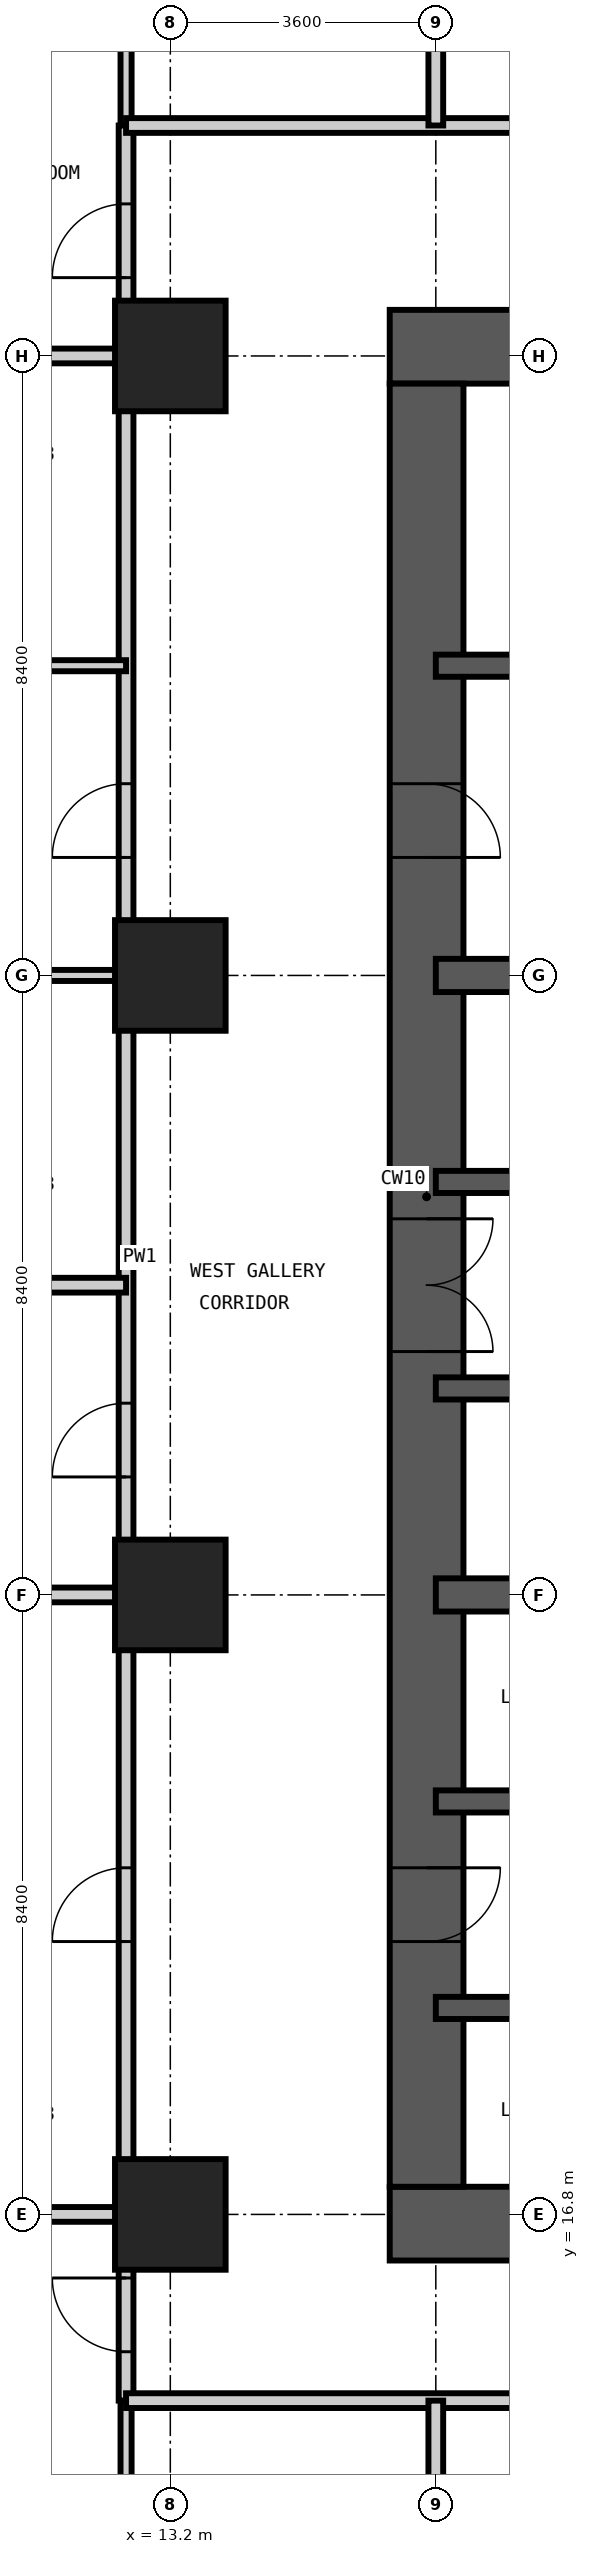
"""IFC4 building model, lengths in metres.
Left out: names, types, materials, properties, quantities, classifications, styles, units other than length and angle.
Written with IfcOpenShell. Run it as: python <this file> out.ifc"""

import sys

from ifc_helpers import new_model, si_unit, direction, frame, frame_2d, origin, origin_2d, place, context, subcontext, project, spatial, rectangle, extrude, element, fill, save


model = new_model("IFC4")
c1 = context("Model", 3, precision=1e-05, world=origin(), true_north=direction((0.0, 1.0)))
c2 = subcontext(c1, "Body", "Model", "MODEL_VIEW")
j1 = project(units=[si_unit("LENGTHUNIT", "METRE"), si_unit("PLANEANGLEUNIT", "RADIAN")], contexts=[c1])
p1 = place(None, origin())
s1 = spatial("IfcSite", under=j1, at=p1, CompositionType="ELEMENT")
p2 = place(p1, origin())
s2 = spatial("IfcBuilding", under=s1, at=p2, CompositionType="ELEMENT")
p3 = place(p2, frame((0.0, 0.0, 133.2)))
s3 = spatial("IfcBuildingStorey", under=s2, at=p3, CompositionType="ELEMENT", Elevation=133.2)
for number, where, z_axis, x_axis in (
    (1, (13.2, 16.8, -0.35), (0.0, 0.0, 1.0), (1.0, 0.0, 0.0)),
    (2, (13.2, 25.2, -0.35), (0.0, 0.0, 1.0), (1.0, 0.0, 0.0)),
    (3, (13.2, 33.6, -0.35), (0.0, 0.0, 1.0), (1.0, 0.0, 0.0)),
    (4, (13.2, 42.0, -0.35), (0.0, 0.0, 1.0), (1.0, 0.0, 0.0)),
):
    element("IfcColumn", number, at=place(p3, frame(where, z_axis=z_axis, x_axis=x_axis)), inside=s3, PredefinedType="COLUMN", context=c2, shape_type="SweptSolid", body=[
        extrude(rectangle(XDim=1.5, YDim=1.5, at=origin_2d()), origin(), (0.0, 0.0, 1.0), 3.6),
    ])
p4 = place(p3, frame((16.175, 16.675, -0.35), z_axis=(0.0, 0.0, 1.0), x_axis=(1.0, 0.0, 0.0)))
e5 = element("IfcWall", 5, at=p4, inside=s3, PredefinedType="SHEAR", context=c2, shape_type="SweptSolid", body=[
    extrude(rectangle(XDim=26.45, YDim=1.0, at=frame_2d((13.225, 0.0))), origin(), (0.0, 0.0, 1.0), 3.6),
])
p5 = place(p4, frame((12.725, 0.0, 0.35)))
e6 = element("IfcOpeningElement", 6, at=p5, cuts=e5, PredefinedType="OPENING", context=c2, shape_type="SweptSolid", body=[
    extrude(rectangle(XDim=1.0, YDim=2.1, at=frame_2d((0.5, 1.05))), frame((0.0, 0.51, 0.0), z_axis=(0.0, -1.0, 0.0), x_axis=(1.0, 0.0, 0.0)), (0.0, 0.0, 1.0), 1.02),
])
p6 = place(p4, frame((19.025, 0.0, 0.35)))
e7 = element("IfcOpeningElement", 7, at=p6, cuts=e5, PredefinedType="OPENING", context=c2, shape_type="SweptSolid", body=[
    extrude(rectangle(XDim=1.0, YDim=2.1, at=frame_2d((0.5, 1.05))), frame((0.0, 0.51, 0.0), z_axis=(0.0, -1.0, 0.0), x_axis=(1.0, 0.0, 0.0)), (0.0, 0.0, 1.0), 1.02),
])
p7 = place(p3, frame((42.625, 42.125, -0.35), z_axis=(0.0, 0.0, 1.0), x_axis=(-1.0, 0.0, 0.0)))
e8 = element("IfcWall", 8, at=p7, inside=s3, PredefinedType="SHEAR", context=c2, shape_type="SweptSolid", body=[
    extrude(rectangle(XDim=26.45, YDim=1.0, at=frame_2d((13.225, 0.0))), origin(), (0.0, 0.0, 1.0), 3.6),
])
p8 = place(p7, frame((21.125, 0.0, 0.35)))
e9 = element("IfcOpeningElement", 9, at=p8, cuts=e8, PredefinedType="OPENING", context=c2, shape_type="SweptSolid", body=[
    extrude(rectangle(XDim=1.0, YDim=2.1, at=frame_2d((0.5, 1.05))), frame((0.0, 0.51, 0.0), z_axis=(0.0, -1.0, 0.0), x_axis=(1.0, 0.0, 0.0)), (0.0, 0.0, 1.0), 1.02),
])
p9 = place(p7, frame((10.525, 0.0, 0.35)))
e10 = element("IfcOpeningElement", 10, at=p9, cuts=e8, PredefinedType="OPENING", context=c2, shape_type="SweptSolid", body=[
    extrude(rectangle(XDim=1.2, YDim=2.2, at=frame_2d((0.6, 1.1))), frame((0.0, 0.51, 0.0), z_axis=(0.0, -1.0, 0.0), x_axis=(1.0, 0.0, 0.0)), (0.0, 0.0, 1.0), 1.02),
])
p10 = place(p3, frame((16.675, 41.625, -0.35), z_axis=(0.0, 0.0, 1.0), x_axis=(0.0, -1.0, 0.0)))
e11 = element("IfcWall", 11, at=p10, inside=s3, PredefinedType="SHEAR", context=c2, shape_type="SweptSolid", body=[
    extrude(rectangle(XDim=24.45, YDim=1.0, at=frame_2d((12.225, 0.0))), origin(), (0.0, 0.0, 1.0), 3.6),
])
p11 = place(p10, frame((11.325, 0.0, 0.35)))
e12 = element("IfcOpeningElement", 12, at=p11, cuts=e11, PredefinedType="OPENING", context=c2, shape_type="SweptSolid", body=[
    extrude(rectangle(XDim=1.8, YDim=2.2, at=frame_2d((0.9, 1.1))), frame((0.0, 0.51, 0.0), z_axis=(0.0, -1.0, 0.0), x_axis=(1.0, 0.0, 0.0)), (0.0, 0.0, 1.0), 1.02),
])
p12 = place(p10, frame((20.125, 0.0, 0.35)))
e13 = element("IfcOpeningElement", 13, at=p12, cuts=e11, PredefinedType="OPENING", context=c2, shape_type="SweptSolid", body=[
    extrude(rectangle(XDim=1.0, YDim=2.1, at=frame_2d((0.5, 1.05))), frame((0.0, 0.51, 0.0), z_axis=(0.0, -1.0, 0.0), x_axis=(1.0, 0.0, 0.0)), (0.0, 0.0, 1.0), 1.02),
])
p13 = place(p10, frame((5.425, 0.0, 0.35)))
e14 = element("IfcOpeningElement", 14, at=p13, cuts=e11, PredefinedType="OPENING", context=c2, shape_type="SweptSolid", body=[
    extrude(rectangle(XDim=1.0, YDim=2.1, at=frame_2d((0.5, 1.05))), frame((0.0, 0.51, 0.0), z_axis=(0.0, -1.0, 0.0), x_axis=(1.0, 0.0, 0.0)), (0.0, 0.0, 1.0), 1.02),
])
for number, where, z_axis, x_axis in (
    (15, (16.8, 19.6, -0.35), (0.0, 0.0, 1.0), (1.0, 0.0, 0.0)),
    (16, (16.8, 22.4, -0.35), (0.0, 0.0, 1.0), (1.0, 0.0, 0.0)),
):
    element("IfcWall", number, at=place(p3, frame(where, z_axis=z_axis, x_axis=x_axis)), inside=s3, PredefinedType="SHEAR", context=c2, shape_type="SweptSolid", body=[
        extrude(rectangle(XDim=8.4, YDim=0.3, at=frame_2d((4.2, 0.0))), origin(), (0.0, 0.0, 1.0), 3.6),
    ])
p14 = place(p3, frame((16.8, 28.0, -0.35), z_axis=(0.0, 0.0, 1.0), x_axis=(1.0, 0.0, 0.0)))
e17 = element("IfcWall", 17, at=p14, inside=s3, PredefinedType="SHEAR", context=c2, shape_type="SweptSolid", body=[
    extrude(rectangle(XDim=8.4, YDim=0.3, at=frame_2d((4.2, 0.0))), origin(), (0.0, 0.0, 1.0), 3.6),
])
p15 = place(p14, frame((1.55, 0.0, 0.35)))
e18 = element("IfcOpeningElement", 18, at=p15, cuts=e17, PredefinedType="OPENING", context=c2, shape_type="SweptSolid", body=[
    extrude(rectangle(XDim=1.1, YDim=2.2, at=frame_2d((0.55, 1.1))), frame((0.0, 0.16, 0.0), z_axis=(0.0, -1.0, 0.0), x_axis=(1.0, 0.0, 0.0)), (0.0, 0.0, 1.0), 0.32),
])
p16 = place(p14, frame((5.75, 0.0, 0.35)))
e19 = element("IfcOpeningElement", 19, at=p16, cuts=e17, PredefinedType="OPENING", context=c2, shape_type="SweptSolid", body=[
    extrude(rectangle(XDim=1.1, YDim=2.2, at=frame_2d((0.55, 1.1))), frame((0.0, 0.16, 0.0), z_axis=(0.0, -1.0, 0.0), x_axis=(1.0, 0.0, 0.0)), (0.0, 0.0, 1.0), 0.32),
])
p17 = place(p3, frame((16.8, 30.8, -0.35), z_axis=(0.0, 0.0, 1.0), x_axis=(1.0, 0.0, 0.0)))
e20 = element("IfcWall", 20, at=p17, inside=s3, PredefinedType="SHEAR", context=c2, shape_type="SweptSolid", body=[
    extrude(rectangle(XDim=8.4, YDim=0.3, at=frame_2d((4.2, 0.0))), origin(), (0.0, 0.0, 1.0), 3.6),
])
p18 = place(p17, frame((1.55, 0.0, 0.35)))
e21 = element("IfcOpeningElement", 21, at=p18, cuts=e20, PredefinedType="OPENING", context=c2, shape_type="SweptSolid", body=[
    extrude(rectangle(XDim=1.1, YDim=2.2, at=frame_2d((0.55, 1.1))), frame((0.0, 0.16, 0.0), z_axis=(0.0, -1.0, 0.0), x_axis=(1.0, 0.0, 0.0)), (0.0, 0.0, 1.0), 0.32),
])
p19 = place(p17, frame((5.75, 0.0, 0.35)))
e22 = element("IfcOpeningElement", 22, at=p19, cuts=e20, PredefinedType="OPENING", context=c2, shape_type="SweptSolid", body=[
    extrude(rectangle(XDim=1.1, YDim=2.2, at=frame_2d((0.55, 1.1))), frame((0.0, 0.16, 0.0), z_axis=(0.0, -1.0, 0.0), x_axis=(1.0, 0.0, 0.0)), (0.0, 0.0, 1.0), 0.32),
])
p20 = place(p3, frame((16.8, 37.8, -0.35), z_axis=(0.0, 0.0, 1.0), x_axis=(1.0, 0.0, 0.0)))
e23 = element("IfcWall", 23, at=p20, inside=s3, PredefinedType="SHEAR", context=c2, shape_type="SweptSolid", body=[
    extrude(rectangle(XDim=8.4, YDim=0.3, at=frame_2d((4.2, 0.0))), origin(), (0.0, 0.0, 1.0), 3.6),
])
p21 = place(p3, frame((16.8, 25.2, -0.35), z_axis=(0.0, 0.0, 1.0), x_axis=(1.0, 0.0, 0.0)))
e24 = element("IfcWall", 24, at=p21, inside=s3, PredefinedType="SHEAR", context=c2, shape_type="SweptSolid", body=[
    extrude(rectangle(XDim=25.2, YDim=0.45, at=frame_2d((12.6, 0.0))), origin(), (0.0, 0.0, 1.0), 3.6),
])
p22 = place(p3, frame((16.8, 33.6, -0.35), z_axis=(0.0, 0.0, 1.0), x_axis=(1.0, 0.0, 0.0)))
e25 = element("IfcWall", 25, at=p22, inside=s3, PredefinedType="SHEAR", context=c2, shape_type="SweptSolid", body=[
    extrude(rectangle(XDim=25.2, YDim=0.45, at=frame_2d((12.6, 0.0))), origin(), (0.0, 0.0, 1.0), 3.6),
])
p23 = place(p22, frame((22.6, 0.0, 0.35)))
e26 = element("IfcOpeningElement", 26, at=p23, cuts=e25, PredefinedType="OPENING", context=c2, shape_type="SweptSolid", body=[
    extrude(rectangle(XDim=1.0, YDim=2.1, at=frame_2d((0.5, 1.05))), frame((0.0, 0.235, 0.0), z_axis=(0.0, -1.0, 0.0), x_axis=(1.0, 0.0, 0.0)), (0.0, 0.0, 1.0), 0.47),
])
for number, where, z_axis, x_axis in (
    (27, (12.6, 11.275, 0.0), (0.0, 0.0, 1.0), (0.0, 1.0, 0.0)),
    (28, (12.6, 45.125, 0.0), (0.0, 0.0, 1.0), (0.0, 1.0, 0.0)),
):
    element("IfcWall", number, at=place(p3, frame(where, z_axis=z_axis, x_axis=x_axis)), inside=s3, PredefinedType="PARTITIONING", context=c2, shape_type="SweptSolid", body=[
        extrude(rectangle(XDim=3.0, YDim=0.15, at=frame_2d((1.5, 0.0))), origin(), (0.0, 0.0, 1.0), 3.25),
    ])
p24 = place(p3, frame((12.6, 14.275, 0.0), z_axis=(0.0, 0.0, 1.0), x_axis=(0.0, 1.0, 0.0)))
e29 = element("IfcWall", 29, at=p24, inside=s3, PredefinedType="PARTITIONING", context=c2, shape_type="SweptSolid", body=[
    extrude(rectangle(XDim=30.85, YDim=0.2, at=frame_2d((15.425, 0.0))), origin(), (0.0, 0.0, 1.0), 3.25),
])
p25 = place(p24, frame((6.225, 0.0, 0.0)))
e30 = element("IfcOpeningElement", 30, at=p25, cuts=e29, PredefinedType="OPENING", context=c2, shape_type="SweptSolid", body=[
    extrude(rectangle(XDim=1.0, YDim=2.2, at=frame_2d((0.5, 1.1))), frame((0.0, 0.11, 0.0), z_axis=(0.0, -1.0, 0.0), x_axis=(1.0, 0.0, 0.0)), (0.0, 0.0, 1.0), 0.22),
])
p26 = place(p24, frame((12.525, 0.0, 0.0)))
e31 = element("IfcOpeningElement", 31, at=p26, cuts=e29, PredefinedType="OPENING", context=c2, shape_type="SweptSolid", body=[
    extrude(rectangle(XDim=1.0, YDim=2.2, at=frame_2d((0.5, 1.1))), frame((0.0, 0.11, 0.0), z_axis=(0.0, -1.0, 0.0), x_axis=(1.0, 0.0, 0.0)), (0.0, 0.0, 1.0), 0.22),
])
p27 = place(p24, frame((20.925, 0.0, 0.0)))
e32 = element("IfcOpeningElement", 32, at=p27, cuts=e29, PredefinedType="OPENING", context=c2, shape_type="SweptSolid", body=[
    extrude(rectangle(XDim=1.0, YDim=2.2, at=frame_2d((0.5, 1.1))), frame((0.0, 0.11, 0.0), z_axis=(0.0, -1.0, 0.0), x_axis=(1.0, 0.0, 0.0)), (0.0, 0.0, 1.0), 0.22),
])
p28 = place(p24, frame((0.663, 0.0, 0.0)))
e33 = element("IfcOpeningElement", 33, at=p28, cuts=e29, PredefinedType="OPENING", context=c2, shape_type="SweptSolid", body=[
    extrude(rectangle(XDim=1.0, YDim=2.2, at=frame_2d((0.5, 1.1))), frame((0.0, 0.11, 0.0), z_axis=(0.0, -1.0, 0.0), x_axis=(1.0, 0.0, 0.0)), (0.0, 0.0, 1.0), 0.22),
])
p29 = place(p24, frame((28.787, 0.0, 0.0)))
e34 = element("IfcOpeningElement", 34, at=p29, cuts=e29, PredefinedType="OPENING", context=c2, shape_type="SweptSolid", body=[
    extrude(rectangle(XDim=1.0, YDim=2.2, at=frame_2d((0.5, 1.1))), frame((0.0, 0.11, 0.0), z_axis=(0.0, -1.0, 0.0), x_axis=(1.0, 0.0, 0.0)), (0.0, 0.0, 1.0), 0.22),
])
p30 = place(p3, frame((12.6, 45.125, 0.0), z_axis=(0.0, 0.0, 1.0), x_axis=(1.0, 0.0, 0.0)))
e35 = element("IfcWall", 35, at=p30, inside=s3, PredefinedType="PARTITIONING", context=c2, shape_type="SweptSolid", body=[
    extrude(rectangle(XDim=33.125, YDim=0.2, at=frame_2d((16.562, 0.0))), origin(), (0.0, 0.0, 1.0), 3.25),
])
p31 = place(p30, frame((5.8, 0.0, 0.0)))
e36 = element("IfcOpeningElement", 36, at=p31, cuts=e35, PredefinedType="OPENING", context=c2, shape_type="SweptSolid", body=[
    extrude(rectangle(XDim=1.0, YDim=2.2, at=frame_2d((0.5, 1.1))), frame((0.0, 0.11, 0.0), z_axis=(0.0, -1.0, 0.0), x_axis=(1.0, 0.0, 0.0)), (0.0, 0.0, 1.0), 0.22),
])
p32 = place(p30, frame((12.1, 0.0, 0.0)))
e37 = element("IfcOpeningElement", 37, at=p32, cuts=e35, PredefinedType="OPENING", context=c2, shape_type="SweptSolid", body=[
    extrude(rectangle(XDim=1.0, YDim=2.2, at=frame_2d((0.5, 1.1))), frame((0.0, 0.11, 0.0), z_axis=(0.0, -1.0, 0.0), x_axis=(1.0, 0.0, 0.0)), (0.0, 0.0, 1.0), 0.22),
])
p33 = place(p30, frame((20.5, 0.0, 0.0)))
e38 = element("IfcOpeningElement", 38, at=p33, cuts=e35, PredefinedType="OPENING", context=c2, shape_type="SweptSolid", body=[
    extrude(rectangle(XDim=1.0, YDim=2.2, at=frame_2d((0.5, 1.1))), frame((0.0, 0.11, 0.0), z_axis=(0.0, -1.0, 0.0), x_axis=(1.0, 0.0, 0.0)), (0.0, 0.0, 1.0), 0.22),
])
p34 = place(p30, frame((26.8, 0.0, 0.0)))
e39 = element("IfcOpeningElement", 39, at=p34, cuts=e35, PredefinedType="OPENING", context=c2, shape_type="SweptSolid", body=[
    extrude(rectangle(XDim=1.0, YDim=2.2, at=frame_2d((0.5, 1.1))), frame((0.0, 0.11, 0.0), z_axis=(0.0, -1.0, 0.0), x_axis=(1.0, 0.0, 0.0)), (0.0, 0.0, 1.0), 0.22),
])
p35 = place(p3, frame((45.725, 14.275, 0.0), z_axis=(0.0, 0.0, 1.0), x_axis=(-1.0, 0.0, 0.0)))
e40 = element("IfcWall", 40, at=p35, inside=s3, PredefinedType="PARTITIONING", context=c2, shape_type="SweptSolid", body=[
    extrude(rectangle(XDim=33.125, YDim=0.2, at=frame_2d((16.562, 0.0))), origin(), (0.0, 0.0, 1.0), 3.25),
])
p36 = place(p35, frame((26.325, 0.0, 0.0)))
e41 = element("IfcOpeningElement", 41, at=p36, cuts=e40, PredefinedType="OPENING", context=c2, shape_type="SweptSolid", body=[
    extrude(rectangle(XDim=1.0, YDim=2.2, at=frame_2d((0.5, 1.1))), frame((0.0, 0.11, 0.0), z_axis=(0.0, -1.0, 0.0), x_axis=(1.0, 0.0, 0.0)), (0.0, 0.0, 1.0), 0.22),
])
p37 = place(p35, frame((21.225, 0.0, 0.0)))
e42 = element("IfcOpeningElement", 42, at=p37, cuts=e40, PredefinedType="OPENING", context=c2, shape_type="SweptSolid", body=[
    extrude(rectangle(XDim=1.0, YDim=2.2, at=frame_2d((0.5, 1.1))), frame((0.0, 0.11, 0.0), z_axis=(0.0, -1.0, 0.0), x_axis=(1.0, 0.0, 0.0)), (0.0, 0.0, 1.0), 0.22),
])
p38 = place(p35, frame((12.825, 0.0, 0.0)))
e43 = element("IfcOpeningElement", 43, at=p38, cuts=e40, PredefinedType="OPENING", context=c2, shape_type="SweptSolid", body=[
    extrude(rectangle(XDim=1.0, YDim=2.2, at=frame_2d((0.5, 1.1))), frame((0.0, 0.11, 0.0), z_axis=(0.0, -1.0, 0.0), x_axis=(1.0, 0.0, 0.0)), (0.0, 0.0, 1.0), 0.22),
])
p39 = place(p35, frame((5.325, 0.0, 0.0)))
e44 = element("IfcOpeningElement", 44, at=p39, cuts=e40, PredefinedType="OPENING", context=c2, shape_type="SweptSolid", body=[
    extrude(rectangle(XDim=1.0, YDim=2.2, at=frame_2d((0.5, 1.1))), frame((0.0, 0.11, 0.0), z_axis=(0.0, -1.0, 0.0), x_axis=(1.0, 0.0, 0.0)), (0.0, 0.0, 1.0), 0.22),
])
p40 = place(p3, frame((16.8, -0.018, 0.0), z_axis=(0.0, 0.0, 1.0), x_axis=(0.0, 1.0, 0.0)))
e45 = element("IfcWall", 45, at=p40, inside=s3, PredefinedType="PARTITIONING", context=c2, shape_type="SweptSolid", body=[
    extrude(rectangle(XDim=14.293, YDim=0.2, at=frame_2d((7.146, 0.0))), origin(), (0.0, 0.0, 1.0), 3.25),
])
p41 = place(p3, frame((16.8, 45.125, 0.0), z_axis=(0.0, 0.0, 1.0), x_axis=(0.0, 1.0, 0.0)))
e46 = element("IfcWall", 46, at=p41, inside=s3, PredefinedType="PARTITIONING", context=c2, shape_type="SweptSolid", body=[
    extrude(rectangle(XDim=9.493, YDim=0.2, at=frame_2d((4.747, 0.0))), origin(), (0.0, 0.0, 1.0), 3.25),
])
for number, where, z_axis, x_axis in (
    (47, (-0.018, 16.8, 0.0), (0.0, 0.0, 1.0), (1.0, 0.0, 0.0)),
    (48, (-0.018, 25.2, 0.0), (0.0, 0.0, 1.0), (1.0, 0.0, 0.0)),
    (49, (-0.018, 29.4, 0.0), (0.0, 0.0, 1.0), (1.0, 0.0, 0.0)),
    (50, (-0.018, 42.0, 0.0), (0.0, 0.0, 1.0), (1.0, 0.0, 0.0)),
):
    element("IfcWall", number, at=place(p3, frame(where, z_axis=z_axis, x_axis=x_axis)), inside=s3, PredefinedType="PARTITIONING", context=c2, shape_type="SweptSolid", body=[
        extrude(rectangle(XDim=12.618, YDim=0.2, at=frame_2d((6.309, 0.0))), origin(), (0.0, 0.0, 1.0), 3.25),
    ])
p42 = place(p3, frame((-0.018, 33.6, 0.0), z_axis=(0.0, 0.0, 1.0), x_axis=(1.0, 0.0, 0.0)))
e51 = element("IfcWall", 51, at=p42, inside=s3, PredefinedType="PARTITIONING", context=c2, shape_type="SweptSolid", body=[
    extrude(rectangle(XDim=12.618, YDim=0.15, at=frame_2d((6.309, 0.0))), origin(), (0.0, 0.0, 1.0), 3.25),
])
p43 = place(p42, frame((5.868, 0.0, 0.0)))
e52 = element("IfcOpeningElement", 52, at=p43, cuts=e51, PredefinedType="OPENING", context=c2, shape_type="SweptSolid", body=[
    extrude(rectangle(XDim=0.9, YDim=2.1, at=frame_2d((0.45, 1.05))), frame((0.0, 0.085, 0.0), z_axis=(0.0, -1.0, 0.0), x_axis=(1.0, 0.0, 0.0)), (0.0, 0.0, 1.0), 0.17),
])
p44 = place(p3, frame((-0.018, 37.8, 0.0), z_axis=(0.0, 0.0, 1.0), x_axis=(1.0, 0.0, 0.0)))
e53 = element("IfcWall", 53, at=p44, inside=s3, PredefinedType="PARTITIONING", context=c2, shape_type="SweptSolid", body=[
    extrude(rectangle(XDim=12.618, YDim=0.15, at=frame_2d((6.309, 0.0))), origin(), (0.0, 0.0, 1.0), 3.25),
])
p45 = place(p44, frame((5.868, 0.0, 0.0)))
e54 = element("IfcOpeningElement", 54, at=p45, cuts=e53, PredefinedType="OPENING", context=c2, shape_type="SweptSolid", body=[
    extrude(rectangle(XDim=0.9, YDim=2.1, at=frame_2d((0.45, 1.05))), frame((0.0, 0.085, 0.0), z_axis=(0.0, -1.0, 0.0), x_axis=(1.0, 0.0, 0.0)), (0.0, 0.0, 1.0), 0.17),
])
p46 = place(p25, origin())
e55 = element("IfcDoor", 55, at=p46, inside=s3, OperationType="SINGLE_SWING_LEFT", PredefinedType="DOOR", context=c2, shape_type="SweptSolid", body=[
    extrude(rectangle(XDim=1.0, YDim=2.2, at=frame_2d((0.5, 1.1))), frame((0.0, 0.025, 0.0), z_axis=(0.0, -1.0, 0.0), x_axis=(1.0, 0.0, 0.0)), (0.0, 0.0, 1.0), 0.05),
])
fill(e30, e55)
p47 = place(p26, origin())
e56 = element("IfcDoor", 56, at=p47, inside=s3, OperationType="SINGLE_SWING_LEFT", PredefinedType="DOOR", context=c2, shape_type="SweptSolid", body=[
    extrude(rectangle(XDim=1.0, YDim=2.2, at=frame_2d((0.5, 1.1))), frame((0.0, 0.025, 0.0), z_axis=(0.0, -1.0, 0.0), x_axis=(1.0, 0.0, 0.0)), (0.0, 0.0, 1.0), 0.05),
])
fill(e31, e56)
p48 = place(p27, origin())
e57 = element("IfcDoor", 57, at=p48, inside=s3, OperationType="SINGLE_SWING_LEFT", PredefinedType="DOOR", context=c2, shape_type="SweptSolid", body=[
    extrude(rectangle(XDim=1.0, YDim=2.2, at=frame_2d((0.5, 1.1))), frame((0.0, 0.025, 0.0), z_axis=(0.0, -1.0, 0.0), x_axis=(1.0, 0.0, 0.0)), (0.0, 0.0, 1.0), 0.05),
])
fill(e32, e57)
p49 = place(p28, origin())
e58 = element("IfcDoor", 58, at=p49, inside=s3, OperationType="SINGLE_SWING_RIGHT", PredefinedType="DOOR", context=c2, shape_type="SweptSolid", body=[
    extrude(rectangle(XDim=1.0, YDim=2.2, at=frame_2d((0.5, 1.1))), frame((0.0, 0.025, 0.0), z_axis=(0.0, -1.0, 0.0), x_axis=(1.0, 0.0, 0.0)), (0.0, 0.0, 1.0), 0.05),
])
fill(e33, e58)
p50 = place(p29, origin())
e59 = element("IfcDoor", 59, at=p50, inside=s3, OperationType="SINGLE_SWING_LEFT", PredefinedType="DOOR", context=c2, shape_type="SweptSolid", body=[
    extrude(rectangle(XDim=1.0, YDim=2.2, at=frame_2d((0.5, 1.1))), frame((0.0, 0.025, 0.0), z_axis=(0.0, -1.0, 0.0), x_axis=(1.0, 0.0, 0.0)), (0.0, 0.0, 1.0), 0.05),
])
fill(e34, e59)
p51 = place(p11, origin())
e60 = element("IfcDoor", 60, at=p51, inside=s3, OperationType="DOUBLE_DOOR_DOUBLE_SWING", PredefinedType="DOOR", context=c2, shape_type="SweptSolid", body=[
    extrude(rectangle(XDim=1.8, YDim=2.2, at=frame_2d((0.9, 1.1))), frame((0.0, 0.025, 0.0), z_axis=(0.0, -1.0, 0.0), x_axis=(1.0, 0.0, 0.0)), (0.0, 0.0, 1.0), 0.05),
])
fill(e12, e60)
p52 = place(p12, origin())
e61 = element("IfcDoor", 61, at=p52, inside=s3, OperationType="SINGLE_SWING_LEFT", PredefinedType="DOOR", context=c2, shape_type="SweptSolid", body=[
    extrude(rectangle(XDim=1.0, YDim=2.1, at=frame_2d((0.5, 1.05))), frame((0.0, 0.025, 0.0), z_axis=(0.0, -1.0, 0.0), x_axis=(1.0, 0.0, 0.0)), (0.0, 0.0, 1.0), 0.05),
])
fill(e13, e61)
p53 = place(p13, origin())
e62 = element("IfcDoor", 62, at=p53, inside=s3, OperationType="SINGLE_SWING_RIGHT", PredefinedType="DOOR", context=c2, shape_type="SweptSolid", body=[
    extrude(rectangle(XDim=1.0, YDim=2.1, at=frame_2d((0.5, 1.05))), frame((0.0, 0.025, 0.0), z_axis=(0.0, -1.0, 0.0), x_axis=(1.0, 0.0, 0.0)), (0.0, 0.0, 1.0), 0.05),
])
fill(e14, e62)
save(model, sys.argv[1])
